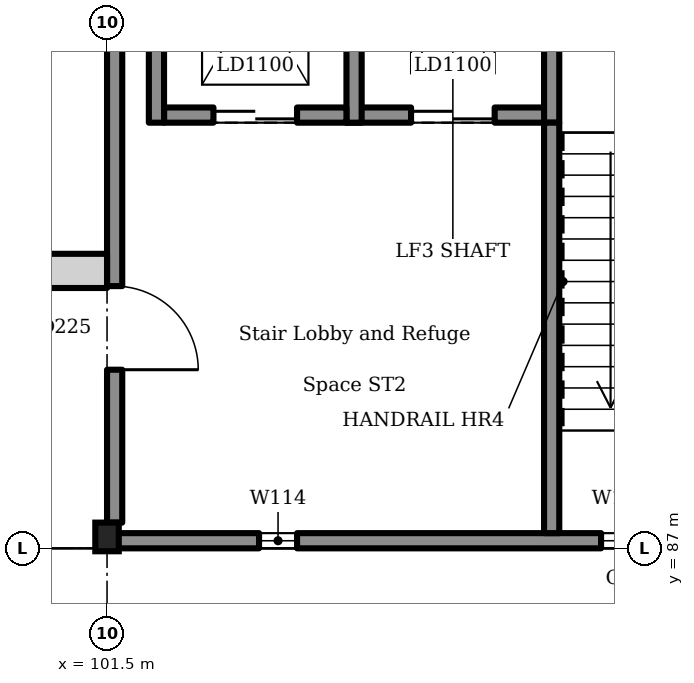
"""IFC4 building model, lengths in metres.
Left out: names, types, materials, properties, quantities, classifications, styles, units other than length and angle.
Written with IfcOpenShell. Run it as: python <this file> out.ifc"""

import sys

from ifc_helpers import new_model, si_unit, direction, frame, frame_2d, origin, origin_2d, place, context, subcontext, project, spatial, rectangle, i_section, extrude, element, fill, save


model = new_model("IFC4")
c1 = context("Model", 3, precision=1e-05, world=origin(), true_north=direction((0.0, 1.0)))
c2 = subcontext(c1, "Body", "Model", "MODEL_VIEW")
j1 = project(units=[si_unit("LENGTHUNIT", "METRE"), si_unit("PLANEANGLEUNIT", "RADIAN")], contexts=[c1])
p1 = place(None, origin())
s1 = spatial("IfcSite", under=j1, at=p1, CompositionType="ELEMENT")
p2 = place(p1, origin())
s2 = spatial("IfcBuilding", under=s1, at=p2, CompositionType="ELEMENT")
p3 = place(p2, origin())
s3 = spatial("IfcBuildingStorey", under=s2, at=p3, CompositionType="ELEMENT", Elevation=0.0)
p4 = place(p3, frame((104.65, 92.7, -1.1), z_axis=(0.0, 0.0, 1.0), x_axis=(1.0, 0.0, 0.0)))
e1 = element("IfcWall", 1, at=p4, inside=s3, PredefinedType="SOLIDWALL", context=c2, shape_type="SweptSolid", body=[
    extrude(rectangle(XDim=2.6, YDim=0.2, at=frame_2d((1.3, 0.0))), origin(), (0.0, 0.0, 1.0), 6.5),
])
p5 = place(p4, frame((0.85, 0.0, 1.1)))
e2 = element("IfcOpeningElement", 2, at=p5, cuts=e1, PredefinedType="OPENING", context=c2, shape_type="SweptSolid", body=[
    extrude(rectangle(XDim=1.1, YDim=2.1, at=frame_2d((0.55, 1.05))), frame((0.0, 0.11, 0.0), z_axis=(0.0, -1.0, 0.0), x_axis=(1.0, 0.0, 0.0)), (0.0, 0.0, 1.0), 0.22),
])
for number, where, z_axis, x_axis in (
    (3, (104.75, 92.6, -1.1), (0.0, 0.0, 1.0), (0.0, 1.0, 0.0)),
    (4, (107.35, 92.6, -1.1), (0.0, 0.0, 1.0), (0.0, 1.0, 0.0)),
):
    element("IfcWall", number, at=place(p3, frame(where, z_axis=z_axis, x_axis=x_axis)), inside=s3, PredefinedType="SOLIDWALL", context=c2, shape_type="SweptSolid", body=[
        extrude(rectangle(XDim=3.4, YDim=0.2, at=frame_2d((1.7, 0.0))), origin(), (0.0, 0.0, 1.0), 6.5),
    ])
p6 = place(p3, frame((102.25, 92.7, -1.1), z_axis=(0.0, 0.0, 1.0), x_axis=(1.0, 0.0, 0.0)))
e5 = element("IfcWall", 5, at=p6, inside=s3, PredefinedType="SOLIDWALL", context=c2, shape_type="SweptSolid", body=[
    extrude(rectangle(XDim=2.4, YDim=0.2, at=frame_2d((1.2, 0.0))), origin(), (0.0, 0.0, 1.0), 6.5),
])
p7 = place(p6, frame((0.65, 0.0, 1.1)))
e6 = element("IfcOpeningElement", 6, at=p7, cuts=e5, PredefinedType="OPENING", context=c2, shape_type="SweptSolid", body=[
    extrude(rectangle(XDim=1.1, YDim=2.1, at=frame_2d((0.55, 1.05))), frame((0.0, 0.11, 0.0), z_axis=(0.0, -1.0, 0.0), x_axis=(1.0, 0.0, 0.0)), (0.0, 0.0, 1.0), 0.22),
])
p8 = place(p3, frame((102.15, 92.6, -1.1), z_axis=(0.0, 0.0, 1.0), x_axis=(0.0, 1.0, 0.0)))
e7 = element("IfcWall", 7, at=p8, inside=s3, PredefinedType="SOLIDWALL", context=c2, shape_type="SweptSolid", body=[
    extrude(rectangle(XDim=3.4, YDim=0.2, at=frame_2d((1.7, 0.0))), origin(), (0.0, 0.0, 1.0), 6.5),
])
p9 = place(p3, frame((101.5, 87.15, 0.0), z_axis=(0.0, 0.0, 1.0), x_axis=(1.0, 0.0, 0.0)))
e8 = element("IfcColumn", 8, at=p9, inside=s3, PredefinedType="COLUMN", context=c2, shape_type="SweptSolid", body=[
    extrude(i_section(OverallWidth=0.309, OverallDepth=0.377, WebThickness=0.021, FlangeThickness=0.04, FilletRadius=0.027, at=origin_2d()), origin(), (0.0, 0.0, 1.0), 5.4),
])
p10 = place(p3, frame((74.5, 90.65, 0.0), z_axis=(0.0, 0.0, 1.0), x_axis=(1.0, 0.0, 0.0)))
e9 = element("IfcWall", 9, at=p10, inside=s3, PredefinedType="SOLIDWALL", context=c2, shape_type="SweptSolid", body=[
    extrude(rectangle(XDim=27.0, YDim=0.45, at=frame_2d((13.5, 0.0))), origin(), (0.0, 0.0, 1.0), 4.76),
])
p11 = place(p10, frame((12.3, 0.0, 0.0)))
e10 = element("IfcOpeningElement", 10, at=p11, cuts=e9, PredefinedType="OPENING", context=c2, shape_type="SweptSolid", body=[
    extrude(rectangle(XDim=2.4, YDim=2.4, at=frame_2d((1.2, 1.2))), frame((0.0, 0.235, 0.0), z_axis=(0.0, -1.0, 0.0), x_axis=(1.0, 0.0, 0.0)), (0.0, 0.0, 1.0), 0.47),
])
p12 = place(p10, frame((3.5, 0.0, 0.9)))
e11 = element("IfcOpeningElement", 11, at=p12, cuts=e9, PredefinedType="OPENING", context=c2, shape_type="SweptSolid", body=[
    extrude(rectangle(XDim=1.8, YDim=2.8, at=frame_2d((0.9, 1.4))), frame((0.0, 0.235, 0.0), z_axis=(0.0, -1.0, 0.0), x_axis=(1.0, 0.0, 0.0)), (0.0, 0.0, 1.0), 0.47),
])
p13 = place(p10, frame((8.1, 0.0, 0.9)))
e12 = element("IfcOpeningElement", 12, at=p13, cuts=e9, PredefinedType="OPENING", context=c2, shape_type="SweptSolid", body=[
    extrude(rectangle(XDim=1.8, YDim=2.8, at=frame_2d((0.9, 1.4))), frame((0.0, 0.235, 0.0), z_axis=(0.0, -1.0, 0.0), x_axis=(1.0, 0.0, 0.0)), (0.0, 0.0, 1.0), 0.47),
])
p14 = place(p10, frame((17.1, 0.0, 0.9)))
e13 = element("IfcOpeningElement", 13, at=p14, cuts=e9, PredefinedType="OPENING", context=c2, shape_type="SweptSolid", body=[
    extrude(rectangle(XDim=1.8, YDim=2.8, at=frame_2d((0.9, 1.4))), frame((0.0, 0.235, 0.0), z_axis=(0.0, -1.0, 0.0), x_axis=(1.0, 0.0, 0.0)), (0.0, 0.0, 1.0), 0.47),
])
p15 = place(p10, frame((21.6, 0.0, 0.9)))
e14 = element("IfcOpeningElement", 14, at=p15, cuts=e9, PredefinedType="OPENING", context=c2, shape_type="SweptSolid", body=[
    extrude(rectangle(XDim=1.8, YDim=2.8, at=frame_2d((0.9, 1.4))), frame((0.0, 0.235, 0.0), z_axis=(0.0, -1.0, 0.0), x_axis=(1.0, 0.0, 0.0)), (0.0, 0.0, 1.0), 0.47),
])
p16 = place(p3, frame((101.6, 87.338, 0.0), z_axis=(0.0, 0.0, 1.0), x_axis=(0.0, 1.0, 0.0)))
e15 = element("IfcWall", 15, at=p16, inside=s3, PredefinedType="SOLIDWALL", context=c2, shape_type="SweptSolid", body=[
    extrude(rectangle(XDim=8.473, YDim=0.2, at=frame_2d((4.237, 0.0))), origin(), (0.0, 0.0, 1.0), 5.2),
])
p17 = place(p16, frame((2.011, 0.0, 0.0)))
e16 = element("IfcOpeningElement", 16, at=p17, cuts=e15, PredefinedType="OPENING", context=c2, shape_type="SweptSolid", body=[
    extrude(rectangle(XDim=1.1, YDim=2.1, at=frame_2d((0.55, 1.05))), frame((0.0, 0.11, 0.0), z_axis=(0.0, -1.0, 0.0), x_axis=(1.0, 0.0, 0.0)), (0.0, 0.0, 1.0), 0.22),
])
p18 = place(p3, frame((101.511, 87.1, 0.0), z_axis=(0.0, 0.0, 1.0), x_axis=(1.0, 0.0, 0.0)))
e17 = element("IfcWall", 17, at=p18, inside=s3, PredefinedType="SOLIDWALL", context=c2, shape_type="SweptSolid", body=[
    extrude(rectangle(XDim=8.978, YDim=0.2, at=frame_2d((4.489, 0.0))), origin(), (0.0, 0.0, 1.0), 5.2),
])
p19 = place(p18, frame((1.989, 0.0, 3.35)))
e18 = element("IfcOpeningElement", 18, at=p19, cuts=e17, PredefinedType="OPENING", context=c2, shape_type="SweptSolid", body=[
    extrude(rectangle(XDim=0.5, YDim=1.2, at=frame_2d((0.25, 0.6))), frame((0.0, 0.11, 0.0), z_axis=(0.0, -1.0, 0.0), x_axis=(1.0, 0.0, 0.0)), (0.0, 0.0, 1.0), 0.22),
])
p20 = place(p18, frame((6.489, 0.0, 3.35)))
e19 = element("IfcOpeningElement", 19, at=p20, cuts=e17, PredefinedType="OPENING", context=c2, shape_type="SweptSolid", body=[
    extrude(rectangle(XDim=0.5, YDim=1.2, at=frame_2d((0.25, 0.6))), frame((0.0, 0.11, 0.0), z_axis=(0.0, -1.0, 0.0), x_axis=(1.0, 0.0, 0.0)), (0.0, 0.0, 1.0), 0.22),
])
p21 = place(p3, frame((107.35, 87.2, 0.0), z_axis=(0.0, 0.0, 1.0), x_axis=(0.0, 1.0, 0.0)))
e20 = element("IfcWall", 20, at=p21, inside=s3, PredefinedType="SOLIDWALL", context=c2, shape_type="SweptSolid", body=[
    extrude(rectangle(XDim=5.4, YDim=0.2, at=frame_2d((2.7, 0.0))), origin(), (0.0, 0.0, 1.0), 5.2),
])
p22 = place(p5, origin())
e21 = element("IfcDoor", 21, at=p22, inside=s3, OperationType="SLIDING_TO_LEFT", PredefinedType="DOOR", context=c2, shape_type="SweptSolid", body=[
    extrude(rectangle(XDim=1.1, YDim=2.1, at=frame_2d((0.55, 1.05))), frame((0.0, 0.025, 0.0), z_axis=(0.0, -1.0, 0.0), x_axis=(1.0, 0.0, 0.0)), (0.0, 0.0, 1.0), 0.05),
])
fill(e2, e21)
p23 = place(p7, origin())
e22 = element("IfcDoor", 22, at=p23, inside=s3, OperationType="SLIDING_TO_LEFT", PredefinedType="DOOR", context=c2, shape_type="SweptSolid", body=[
    extrude(rectangle(XDim=1.1, YDim=2.1, at=frame_2d((0.55, 1.05))), frame((0.0, 0.025, 0.0), z_axis=(0.0, -1.0, 0.0), x_axis=(1.0, 0.0, 0.0)), (0.0, 0.0, 1.0), 0.05),
])
fill(e6, e22)
p24 = place(p19, origin())
e23 = element("IfcWindow", 23, at=p24, inside=s3, PartitioningType="SINGLE_PANEL", PredefinedType="WINDOW", context=c2, shape_type="SweptSolid", body=[
    extrude(rectangle(XDim=0.5, YDim=1.2, at=frame_2d((0.25, 0.6))), frame((0.0, 0.03, 0.0), z_axis=(0.0, -1.0, 0.0), x_axis=(1.0, 0.0, 0.0)), (0.0, 0.0, 1.0), 0.06),
])
fill(e18, e23)
p25 = place(p20, origin())
e24 = element("IfcWindow", 24, at=p25, inside=s3, PartitioningType="SINGLE_PANEL", PredefinedType="WINDOW", context=c2, shape_type="SweptSolid", body=[
    extrude(rectangle(XDim=0.5, YDim=1.2, at=frame_2d((0.25, 0.6))), frame((0.0, 0.03, 0.0), z_axis=(0.0, -1.0, 0.0), x_axis=(1.0, 0.0, 0.0)), (0.0, 0.0, 1.0), 0.06),
])
fill(e19, e24)
p26 = place(p17, frame((1.1, 0.0, 0.0), z_axis=(0.0, 0.0, 1.0), x_axis=(-1.0, 0.0, 0.0)))
e25 = element("IfcDoor", 25, at=p26, inside=s3, OperationType="SINGLE_SWING_LEFT", PredefinedType="DOOR", context=c2, shape_type="SweptSolid", body=[
    extrude(rectangle(XDim=1.1, YDim=2.1, at=frame_2d((0.55, 1.05))), frame((0.0, 0.025, 0.0), z_axis=(0.0, -1.0, 0.0), x_axis=(1.0, 0.0, 0.0)), (0.0, 0.0, 1.0), 0.05),
])
fill(e16, e25)
save(model, sys.argv[1])
